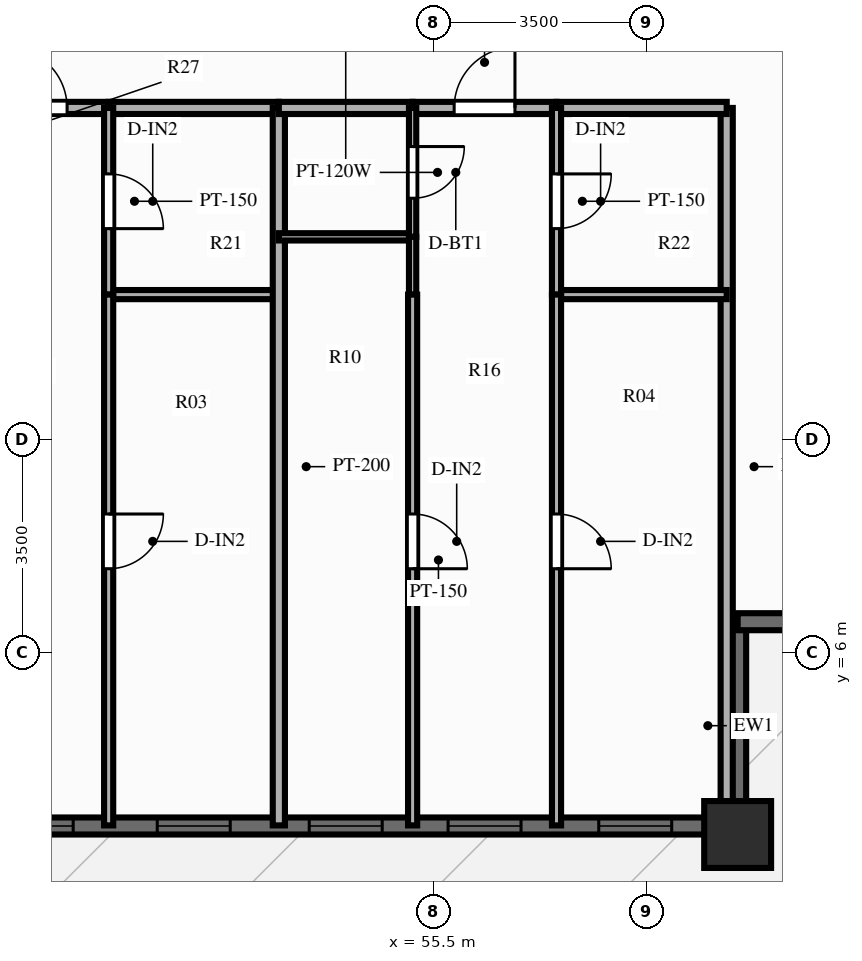
"""IFC4 building model, lengths in metres.
Left out: names, types, materials, properties, quantities, classifications, styles, units other than length and angle.
Written with IfcOpenShell. Run it as: python <this file> out.ifc"""

import sys

from ifc_helpers import new_model, si_unit, direction, frame, frame_2d, origin, origin_2d, place, context, subcontext, project, spatial, rectangle, extrude, source, transform, mapped, element, fill, save


model = new_model("IFC4")
c1 = context("Model", 3, precision=1e-05, world=origin(), true_north=direction((0.0, 1.0)))
c2 = subcontext(c1, "Body", "Model", "MODEL_VIEW")
j1 = project(units=[si_unit("LENGTHUNIT", "METRE"), si_unit("PLANEANGLEUNIT", "RADIAN")], contexts=[c1])
p1 = place(None, origin())
s1 = spatial("IfcSite", under=j1, at=p1, CompositionType="ELEMENT")
p2 = place(p1, origin())
s2 = spatial("IfcBuilding", under=s1, at=p2, CompositionType="ELEMENT")
p3 = place(p2, frame((0.0, 0.0, 19.4)))
s3 = spatial("IfcBuildingStorey", under=s2, at=p3, CompositionType="ELEMENT", Elevation=19.4)
m1 = source(origin(), c2, "Body", "SweptSolid", [
    extrude(rectangle(XDim=1.1, YDim=1.1, at=origin_2d()), origin(), (0.0, 0.0, 1.0), 3.0),
])
p4 = place(p3, frame((60.5, 3.0, 0.0), z_axis=(0.0, 0.0, 1.0), x_axis=(1.0, 0.0, 0.0)))
e1 = element("IfcColumn", 1, at=p4, inside=s3, PredefinedType="COLUMN", context=c2, shape_type="MappedRepresentation", body=[
    mapped(m1, transform((0.0, 0.0, 0.0), scale=1.0)),
])
p5 = place(p3, frame((15.5, 3.14, 0.0), z_axis=(0.0, 0.0, 1.0), x_axis=(1.0, 0.0, 0.0)))
e2 = element("IfcWall", 2, at=p5, inside=s3, PredefinedType="SOLIDWALL", context=c2, shape_type="SweptSolid", body=[
    extrude(rectangle(XDim=45.0, YDim=0.28, at=frame_2d((22.5, 0.0))), origin(), (0.0, 0.0, 1.0), 2.28),
])
p6 = place(p5, frame((0.785, 0.0, 0.25)))
e3 = element("IfcOpeningElement", 3, at=p6, cuts=e2, PredefinedType="OPENING", context=c2, shape_type="SweptSolid", body=[
    extrude(rectangle(XDim=1.2, YDim=1.5, at=frame_2d((0.6, 0.75))), frame((0.0, 0.152, 0.0), z_axis=(0.0, -1.0, 0.0), x_axis=(1.0, 0.0, 0.0)), (0.0, 0.0, 1.0), 0.304),
])
p7 = place(p5, frame((3.033, 0.0, 0.25)))
e4 = element("IfcOpeningElement", 4, at=p7, cuts=e2, PredefinedType="OPENING", context=c2, shape_type="SweptSolid", body=[
    extrude(rectangle(XDim=1.2, YDim=1.5, at=frame_2d((0.6, 0.75))), frame((0.0, 0.152, 0.0), z_axis=(0.0, -1.0, 0.0), x_axis=(1.0, 0.0, 0.0)), (0.0, 0.0, 1.0), 0.304),
])
p8 = place(p5, frame((5.727, 0.0, 0.25)))
e5 = element("IfcOpeningElement", 5, at=p8, cuts=e2, PredefinedType="OPENING", context=c2, shape_type="SweptSolid", body=[
    extrude(rectangle(XDim=1.2, YDim=1.5, at=frame_2d((0.6, 0.75))), frame((0.0, 0.152, 0.0), z_axis=(0.0, -1.0, 0.0), x_axis=(1.0, 0.0, 0.0)), (0.0, 0.0, 1.0), 0.304),
])
p9 = place(p5, frame((8.269, 0.0, 0.25)))
e6 = element("IfcOpeningElement", 6, at=p9, cuts=e2, PredefinedType="OPENING", context=c2, shape_type="SweptSolid", body=[
    extrude(rectangle(XDim=1.2, YDim=1.5, at=frame_2d((0.6, 0.75))), frame((0.0, 0.152, 0.0), z_axis=(0.0, -1.0, 0.0), x_axis=(1.0, 0.0, 0.0)), (0.0, 0.0, 1.0), 0.304),
])
p10 = place(p5, frame((10.621, 0.0, 0.25)))
e7 = element("IfcOpeningElement", 7, at=p10, cuts=e2, PredefinedType="OPENING", context=c2, shape_type="SweptSolid", body=[
    extrude(rectangle(XDim=1.2, YDim=1.5, at=frame_2d((0.6, 0.75))), frame((0.0, 0.152, 0.0), z_axis=(0.0, -1.0, 0.0), x_axis=(1.0, 0.0, 0.0)), (0.0, 0.0, 1.0), 0.304),
])
p11 = place(p5, frame((13.316, 0.0, 0.25)))
e8 = element("IfcOpeningElement", 8, at=p11, cuts=e2, PredefinedType="OPENING", context=c2, shape_type="SweptSolid", body=[
    extrude(rectangle(XDim=1.2, YDim=1.5, at=frame_2d((0.6, 0.75))), frame((0.0, 0.152, 0.0), z_axis=(0.0, -1.0, 0.0), x_axis=(1.0, 0.0, 0.0)), (0.0, 0.0, 1.0), 0.304),
])
p12 = place(p5, frame((16.624, 0.0, 0.25)))
e9 = element("IfcOpeningElement", 9, at=p12, cuts=e2, PredefinedType="OPENING", context=c2, shape_type="SweptSolid", body=[
    extrude(rectangle(XDim=0.7, YDim=1.5, at=frame_2d((0.35, 0.75))), frame((0.0, 0.152, 0.0), z_axis=(0.0, -1.0, 0.0), x_axis=(1.0, 0.0, 0.0)), (0.0, 0.0, 1.0), 0.304),
])
p13 = place(p5, frame((18.141, 0.0, 0.25)))
e10 = element("IfcOpeningElement", 10, at=p13, cuts=e2, PredefinedType="OPENING", context=c2, shape_type="SweptSolid", body=[
    extrude(rectangle(XDim=1.2, YDim=1.5, at=frame_2d((0.6, 0.75))), frame((0.0, 0.152, 0.0), z_axis=(0.0, -1.0, 0.0), x_axis=(1.0, 0.0, 0.0)), (0.0, 0.0, 1.0), 0.304),
])
p14 = place(p5, frame((21.874, 0.0, 0.0), z_axis=(0.0, 0.0, 1.0), x_axis=(-1.0, 0.0, 0.0)))
e11 = element("IfcOpeningElement", 11, at=p14, cuts=e2, PredefinedType="OPENING", context=c2, shape_type="SweptSolid", body=[
    extrude(rectangle(XDim=1.1, YDim=2.15, at=frame_2d((0.55, 1.075))), frame((0.0, 0.152, 0.0), z_axis=(0.0, -1.0, 0.0), x_axis=(1.0, 0.0, 0.0)), (0.0, 0.0, 1.0), 0.304),
])
p15 = place(p5, frame((23.223, 0.0, 0.25)))
e12 = element("IfcOpeningElement", 12, at=p15, cuts=e2, PredefinedType="OPENING", context=c2, shape_type="SweptSolid", body=[
    extrude(rectangle(XDim=1.2, YDim=1.5, at=frame_2d((0.6, 0.75))), frame((0.0, 0.152, 0.0), z_axis=(0.0, -1.0, 0.0), x_axis=(1.0, 0.0, 0.0)), (0.0, 0.0, 1.0), 0.304),
])
p16 = place(p5, frame((25.507, 0.0, 0.25)))
e13 = element("IfcOpeningElement", 13, at=p16, cuts=e2, PredefinedType="OPENING", context=c2, shape_type="SweptSolid", body=[
    extrude(rectangle(XDim=1.2, YDim=1.5, at=frame_2d((0.6, 0.75))), frame((0.0, 0.152, 0.0), z_axis=(0.0, -1.0, 0.0), x_axis=(1.0, 0.0, 0.0)), (0.0, 0.0, 1.0), 0.304),
])
p17 = place(p5, frame((27.6, 0.0, 0.25)))
e14 = element("IfcOpeningElement", 14, at=p17, cuts=e2, PredefinedType="OPENING", context=c2, shape_type="SweptSolid", body=[
    extrude(rectangle(XDim=0.7, YDim=1.5, at=frame_2d((0.35, 0.75))), frame((0.0, 0.152, 0.0), z_axis=(0.0, -1.0, 0.0), x_axis=(1.0, 0.0, 0.0)), (0.0, 0.0, 1.0), 0.304),
])
p18 = place(p5, frame((30.589, 0.0, 0.25)))
e15 = element("IfcOpeningElement", 15, at=p18, cuts=e2, PredefinedType="OPENING", context=c2, shape_type="SweptSolid", body=[
    extrude(rectangle(XDim=1.2, YDim=1.5, at=frame_2d((0.6, 0.75))), frame((0.0, 0.152, 0.0), z_axis=(0.0, -1.0, 0.0), x_axis=(1.0, 0.0, 0.0)), (0.0, 0.0, 1.0), 0.304),
])
p19 = place(p5, frame((32.872, 0.0, 0.25)))
e16 = element("IfcOpeningElement", 16, at=p19, cuts=e2, PredefinedType="OPENING", context=c2, shape_type="SweptSolid", body=[
    extrude(rectangle(XDim=1.2, YDim=1.5, at=frame_2d((0.6, 0.75))), frame((0.0, 0.152, 0.0), z_axis=(0.0, -1.0, 0.0), x_axis=(1.0, 0.0, 0.0)), (0.0, 0.0, 1.0), 0.304),
])
p20 = place(p5, frame((35.455, 0.0, 0.25)))
e17 = element("IfcOpeningElement", 17, at=p20, cuts=e2, PredefinedType="OPENING", context=c2, shape_type="SweptSolid", body=[
    extrude(rectangle(XDim=1.2, YDim=1.5, at=frame_2d((0.6, 0.75))), frame((0.0, 0.152, 0.0), z_axis=(0.0, -1.0, 0.0), x_axis=(1.0, 0.0, 0.0)), (0.0, 0.0, 1.0), 0.304),
])
p21 = place(p5, frame((37.954, 0.0, 0.25)))
e18 = element("IfcOpeningElement", 18, at=p21, cuts=e2, PredefinedType="OPENING", context=c2, shape_type="SweptSolid", body=[
    extrude(rectangle(XDim=1.2, YDim=1.5, at=frame_2d((0.6, 0.75))), frame((0.0, 0.152, 0.0), z_axis=(0.0, -1.0, 0.0), x_axis=(1.0, 0.0, 0.0)), (0.0, 0.0, 1.0), 0.304),
])
p22 = place(p5, frame((40.238, 0.0, 0.25)))
e19 = element("IfcOpeningElement", 19, at=p22, cuts=e2, PredefinedType="OPENING", context=c2, shape_type="SweptSolid", body=[
    extrude(rectangle(XDim=1.2, YDim=1.5, at=frame_2d((0.6, 0.75))), frame((0.0, 0.152, 0.0), z_axis=(0.0, -1.0, 0.0), x_axis=(1.0, 0.0, 0.0)), (0.0, 0.0, 1.0), 0.304),
])
p23 = place(p5, frame((42.716, 0.0, 0.25)))
e20 = element("IfcOpeningElement", 20, at=p23, cuts=e2, PredefinedType="OPENING", context=c2, shape_type="SweptSolid", body=[
    extrude(rectangle(XDim=1.2, YDim=1.5, at=frame_2d((0.6, 0.75))), frame((0.0, 0.152, 0.0), z_axis=(0.0, -1.0, 0.0), x_axis=(1.0, 0.0, 0.0)), (0.0, 0.0, 1.0), 0.304),
])
for number, where, z_axis, x_axis in (
    (21, (60.5, 3.08, 0.0), (0.0, 0.0, 1.0), (0.0, 1.0, 0.0)),
    (22, (60.5, 6.5, 0.0), (0.0, 0.0, 1.0), (1.0, 0.0, 0.0)),
):
    element("IfcWall", number, at=place(p3, frame(where, z_axis=z_axis, x_axis=x_axis)), inside=s3, PredefinedType="SOLIDWALL", context=c2, shape_type="SweptSolid", body=[
        extrude(rectangle(XDim=3.42, YDim=0.28, at=frame_2d((1.71, 0.0))), origin(), (0.0, 0.0, 1.0), 2.28),
    ])
p24 = place(p3, frame((60.32, 14.95, 0.0), z_axis=(0.0, 0.0, 1.0), x_axis=(0.0, -1.0, 0.0)))
e23 = element("IfcWall", 23, at=p24, inside=s3, PredefinedType="PARTITIONING", context=c2, shape_type="SweptSolid", body=[
    extrude(rectangle(XDim=11.8, YDim=0.2, at=frame_2d((5.9, 0.0))), origin(), (0.0, 0.0, 1.0), 2.79),
])
p25 = place(p3, frame((47.789, 14.95, 0.0), z_axis=(0.0, 0.0, 1.0), x_axis=(1.0, 0.0, 0.0)))
e24 = element("IfcWall", 24, at=p25, inside=s3, PredefinedType="PARTITIONING", context=c2, shape_type="SweptSolid", body=[
    extrude(rectangle(XDim=2.367, YDim=0.2, at=frame_2d((1.183, 0.0))), origin(), (0.0, 0.0, 1.0), 2.79),
])
p26 = place(p25, frame((0.683, 0.0, 0.0)))
e25 = element("IfcOpeningElement", 25, at=p26, cuts=e24, PredefinedType="OPENING", context=c2, shape_type="SweptSolid", body=[
    extrude(rectangle(XDim=1.0, YDim=2.15, at=frame_2d((0.5, 1.075))), frame((0.0, 0.112, 0.0), z_axis=(0.0, -1.0, 0.0), x_axis=(1.0, 0.0, 0.0)), (0.0, 0.0, 1.0), 0.224),
])
p27 = place(p3, frame((50.156, 14.95, 0.0), z_axis=(0.0, 0.0, 1.0), x_axis=(1.0, 0.0, 0.0)))
e26 = element("IfcWall", 26, at=p27, inside=s3, PredefinedType="PARTITIONING", context=c2, shape_type="SweptSolid", body=[
    extrude(rectangle(XDim=2.799, YDim=0.2, at=frame_2d((1.399, 0.0))), origin(), (0.0, 0.0, 1.0), 2.79),
])
p28 = place(p3, frame((50.156, 11.88, 0.0), z_axis=(0.0, 0.0, 1.0), x_axis=(1.0, 0.0, 0.0)))
e27 = element("IfcWall", 27, at=p28, inside=s3, PredefinedType="PARTITIONING", context=c2, shape_type="SweptSolid", body=[
    extrude(rectangle(XDim=2.799, YDim=0.15, at=frame_2d((1.399, 0.0))), origin(), (0.0, 0.0, 1.0), 2.79),
])
p29 = place(p3, frame((50.156, 14.95, 0.0), z_axis=(0.0, 0.0, 1.0), x_axis=(0.0, -1.0, 0.0)))
e28 = element("IfcWall", 28, at=p29, inside=s3, PredefinedType="PARTITIONING", context=c2, shape_type="SweptSolid", body=[
    extrude(rectangle(XDim=3.07, YDim=0.15, at=frame_2d((1.535, 0.0))), origin(), (0.0, 0.0, 1.0), 2.79),
])
p30 = place(p29, frame((1.085, 0.0, 0.0)))
e29 = element("IfcOpeningElement", 29, at=p30, cuts=e28, PredefinedType="OPENING", context=c2, shape_type="SweptSolid", body=[
    extrude(rectangle(XDim=0.9, YDim=2.1, at=frame_2d((0.45, 1.05))), frame((0.0, 0.087, 0.0), z_axis=(0.0, -1.0, 0.0), x_axis=(1.0, 0.0, 0.0)), (0.0, 0.0, 1.0), 0.174),
])
p31 = place(p3, frame((50.156, 11.88, 0.0), z_axis=(0.0, 0.0, 1.0), x_axis=(0.0, -1.0, 0.0)))
e30 = element("IfcWall", 30, at=p31, inside=s3, PredefinedType="PARTITIONING", context=c2, shape_type="SweptSolid", body=[
    extrude(rectangle(XDim=8.73, YDim=0.15, at=frame_2d((4.365, 0.0))), origin(), (0.0, 0.0, 1.0), 2.79),
])
p32 = place(p31, frame((3.609, 0.0, 0.0)))
e31 = element("IfcOpeningElement", 31, at=p32, cuts=e30, PredefinedType="OPENING", context=c2, shape_type="SweptSolid", body=[
    extrude(rectangle(XDim=0.9, YDim=2.1, at=frame_2d((0.45, 1.05))), frame((0.0, 0.087, 0.0), z_axis=(0.0, -1.0, 0.0), x_axis=(1.0, 0.0, 0.0)), (0.0, 0.0, 1.0), 0.174),
])
p33 = place(p3, frame((52.954, 14.95, 0.0), z_axis=(0.0, 0.0, 1.0), x_axis=(0.0, -1.0, 0.0)))
e32 = element("IfcWall", 32, at=p33, inside=s3, PredefinedType="PARTITIONING", context=c2, shape_type="SweptSolid", body=[
    extrude(rectangle(XDim=11.8, YDim=0.2, at=frame_2d((5.9, 0.0))), origin(), (0.0, 0.0, 1.0), 2.79),
])
p34 = place(p3, frame((52.954, 14.95, 0.0), z_axis=(0.0, 0.0, 1.0), x_axis=(1.0, 0.0, 0.0)))
e33 = element("IfcWall", 33, at=p34, inside=s3, PredefinedType="PARTITIONING", context=c2, shape_type="SweptSolid", body=[
    extrude(rectangle(XDim=2.2, YDim=0.2, at=frame_2d((1.1, 0.0))), origin(), (0.0, 0.0, 1.0), 2.79),
])
p35 = place(p3, frame((55.154, 14.95, 0.0), z_axis=(0.0, 0.0, 1.0), x_axis=(1.0, 0.0, 0.0)))
e34 = element("IfcWall", 34, at=p35, inside=s3, PredefinedType="PARTITIONING", context=c2, shape_type="SweptSolid", body=[
    extrude(rectangle(XDim=2.367, YDim=0.2, at=frame_2d((1.183, 0.0))), origin(), (0.0, 0.0, 1.0), 2.79),
])
p36 = place(p35, frame((0.683, 0.0, 0.0)))
e35 = element("IfcOpeningElement", 35, at=p36, cuts=e34, PredefinedType="OPENING", context=c2, shape_type="SweptSolid", body=[
    extrude(rectangle(XDim=1.0, YDim=2.15, at=frame_2d((0.5, 1.075))), frame((0.0, 0.112, 0.0), z_axis=(0.0, -1.0, 0.0), x_axis=(1.0, 0.0, 0.0)), (0.0, 0.0, 1.0), 0.224),
])
p37 = place(p3, frame((57.521, 14.95, 0.0), z_axis=(0.0, 0.0, 1.0), x_axis=(1.0, 0.0, 0.0)))
e36 = element("IfcWall", 36, at=p37, inside=s3, PredefinedType="PARTITIONING", context=c2, shape_type="SweptSolid", body=[
    extrude(rectangle(XDim=2.799, YDim=0.2, at=frame_2d((1.399, 0.0))), origin(), (0.0, 0.0, 1.0), 2.79),
])
p38 = place(p3, frame((52.954, 12.83, 0.0), z_axis=(0.0, 0.0, 1.0), x_axis=(1.0, 0.0, 0.0)))
e37 = element("IfcWall", 37, at=p38, inside=s3, PredefinedType="PARTITIONING", context=c2, shape_type="SweptSolid", body=[
    extrude(rectangle(XDim=2.2, YDim=0.12, at=frame_2d((1.1, 0.0))), origin(), (0.0, 0.0, 1.0), 2.79),
])
p39 = place(p3, frame((57.521, 11.88, 0.0), z_axis=(0.0, 0.0, 1.0), x_axis=(1.0, 0.0, 0.0)))
e38 = element("IfcWall", 38, at=p39, inside=s3, PredefinedType="PARTITIONING", context=c2, shape_type="SweptSolid", body=[
    extrude(rectangle(XDim=2.799, YDim=0.15, at=frame_2d((1.399, 0.0))), origin(), (0.0, 0.0, 1.0), 2.79),
])
p40 = place(p3, frame((55.154, 14.95, 0.0), z_axis=(0.0, 0.0, 1.0), x_axis=(0.0, -1.0, 0.0)))
e39 = element("IfcWall", 39, at=p40, inside=s3, PredefinedType="PARTITIONING", context=c2, shape_type="SweptSolid", body=[
    extrude(rectangle(XDim=2.12, YDim=0.12, at=frame_2d((1.06, 0.0))), origin(), (0.0, 0.0, 1.0), 2.79),
])
p41 = place(p40, frame((0.635, 0.0, 0.0)))
e40 = element("IfcOpeningElement", 40, at=p41, cuts=e39, PredefinedType="OPENING", context=c2, shape_type="SweptSolid", body=[
    extrude(rectangle(XDim=0.85, YDim=2.05, at=frame_2d((0.425, 1.025))), frame((0.0, 0.072, 0.0), z_axis=(0.0, -1.0, 0.0), x_axis=(1.0, 0.0, 0.0)), (0.0, 0.0, 1.0), 0.144),
])
p42 = place(p3, frame((55.154, 12.83, 0.0), z_axis=(0.0, 0.0, 1.0), x_axis=(0.0, -1.0, 0.0)))
e41 = element("IfcWall", 41, at=p42, inside=s3, PredefinedType="PARTITIONING", context=c2, shape_type="SweptSolid", body=[
    extrude(rectangle(XDim=0.95, YDim=0.12, at=frame_2d((0.475, 0.0))), origin(), (0.0, 0.0, 1.0), 2.79),
])
p43 = place(p3, frame((55.154, 11.88, 0.0), z_axis=(0.0, 0.0, 1.0), x_axis=(0.0, -1.0, 0.0)))
e42 = element("IfcWall", 42, at=p43, inside=s3, PredefinedType="PARTITIONING", context=c2, shape_type="SweptSolid", body=[
    extrude(rectangle(XDim=8.73, YDim=0.15, at=frame_2d((4.365, 0.0))), origin(), (0.0, 0.0, 1.0), 2.79),
])
p44 = place(p43, frame((3.609, 0.0, 0.0)))
e43 = element("IfcOpeningElement", 43, at=p44, cuts=e42, PredefinedType="OPENING", context=c2, shape_type="SweptSolid", body=[
    extrude(rectangle(XDim=0.9, YDim=2.1, at=frame_2d((0.45, 1.05))), frame((0.0, 0.087, 0.0), z_axis=(0.0, -1.0, 0.0), x_axis=(1.0, 0.0, 0.0)), (0.0, 0.0, 1.0), 0.174),
])
p45 = place(p3, frame((57.521, 14.95, 0.0), z_axis=(0.0, 0.0, 1.0), x_axis=(0.0, -1.0, 0.0)))
e44 = element("IfcWall", 44, at=p45, inside=s3, PredefinedType="PARTITIONING", context=c2, shape_type="SweptSolid", body=[
    extrude(rectangle(XDim=3.07, YDim=0.15, at=frame_2d((1.535, 0.0))), origin(), (0.0, 0.0, 1.0), 2.79),
])
p46 = place(p45, frame((1.085, 0.0, 0.0)))
e45 = element("IfcOpeningElement", 45, at=p46, cuts=e44, PredefinedType="OPENING", context=c2, shape_type="SweptSolid", body=[
    extrude(rectangle(XDim=0.9, YDim=2.1, at=frame_2d((0.45, 1.05))), frame((0.0, 0.087, 0.0), z_axis=(0.0, -1.0, 0.0), x_axis=(1.0, 0.0, 0.0)), (0.0, 0.0, 1.0), 0.174),
])
p47 = place(p3, frame((57.521, 11.88, 0.0), z_axis=(0.0, 0.0, 1.0), x_axis=(0.0, -1.0, 0.0)))
e46 = element("IfcWall", 46, at=p47, inside=s3, PredefinedType="PARTITIONING", context=c2, shape_type="SweptSolid", body=[
    extrude(rectangle(XDim=8.73, YDim=0.15, at=frame_2d((4.365, 0.0))), origin(), (0.0, 0.0, 1.0), 2.79),
])
p48 = place(p47, frame((3.609, 0.0, 0.0)))
e47 = element("IfcOpeningElement", 47, at=p48, cuts=e46, PredefinedType="OPENING", context=c2, shape_type="SweptSolid", body=[
    extrude(rectangle(XDim=0.9, YDim=2.1, at=frame_2d((0.45, 1.05))), frame((0.0, 0.087, 0.0), z_axis=(0.0, -1.0, 0.0), x_axis=(1.0, 0.0, 0.0)), (0.0, 0.0, 1.0), 0.174),
])
m2 = source(origin(), c2, "Body", "SweptSolid", [
    extrude(rectangle(XDim=1.2, YDim=1.5, at=frame_2d((0.6, 0.75))), frame((0.0, 0.03, 0.0), z_axis=(0.0, -1.0, 0.0), x_axis=(1.0, 0.0, 0.0)), (0.0, 0.0, 1.0), 0.06),
])
p49 = place(p19, origin())
e48 = element("IfcWindow", 48, at=p49, inside=s3, PartitioningType="SINGLE_PANEL", PredefinedType="WINDOW", context=c2, shape_type="MappedRepresentation", body=[
    mapped(m2, transform((0.0, 0.0, 0.0), scale=1.0)),
])
fill(e16, e48)
p50 = place(p20, origin())
e49 = element("IfcWindow", 49, at=p50, inside=s3, PartitioningType="SINGLE_PANEL", PredefinedType="WINDOW", context=c2, shape_type="MappedRepresentation", body=[
    mapped(m2, transform((0.0, 0.0, 0.0), scale=1.0)),
])
fill(e17, e49)
p51 = place(p21, origin())
e50 = element("IfcWindow", 50, at=p51, inside=s3, PartitioningType="SINGLE_PANEL", PredefinedType="WINDOW", context=c2, shape_type="MappedRepresentation", body=[
    mapped(m2, transform((0.0, 0.0, 0.0), scale=1.0)),
])
fill(e18, e50)
p52 = place(p22, origin())
e51 = element("IfcWindow", 51, at=p52, inside=s3, PartitioningType="SINGLE_PANEL", PredefinedType="WINDOW", context=c2, shape_type="MappedRepresentation", body=[
    mapped(m2, transform((0.0, 0.0, 0.0), scale=1.0)),
])
fill(e19, e51)
p53 = place(p23, origin())
e52 = element("IfcWindow", 52, at=p53, inside=s3, PartitioningType="SINGLE_PANEL", PredefinedType="WINDOW", context=c2, shape_type="MappedRepresentation", body=[
    mapped(m2, transform((0.0, 0.0, 0.0), scale=1.0)),
])
fill(e20, e52)
m3 = source(origin(), c2, "Body", "SweptSolid", [
    extrude(rectangle(XDim=1.0, YDim=2.15, at=frame_2d((0.5, 1.075))), frame((0.0, 0.025, 0.0), z_axis=(0.0, -1.0, 0.0), x_axis=(1.0, 0.0, 0.0)), (0.0, 0.0, 1.0), 0.05),
])
p54 = place(p26, origin())
e53 = element("IfcDoor", 53, at=p54, inside=s3, OperationType="SINGLE_SWING_LEFT", PredefinedType="DOOR", context=c2, shape_type="MappedRepresentation", body=[
    mapped(m3, transform((0.0, 0.0, 0.0), scale=1.0)),
])
fill(e25, e53)
m4 = source(origin(), c2, "Body", "SweptSolid", [
    extrude(rectangle(XDim=0.9, YDim=2.1, at=frame_2d((0.45, 1.05))), frame((0.0, 0.025, 0.0), z_axis=(0.0, -1.0, 0.0), x_axis=(1.0, 0.0, 0.0)), (0.0, 0.0, 1.0), 0.05),
])
p55 = place(p30, origin())
e54 = element("IfcDoor", 54, at=p55, inside=s3, OperationType="SINGLE_SWING_RIGHT", PredefinedType="DOOR", context=c2, shape_type="MappedRepresentation", body=[
    mapped(m4, transform((0.0, 0.0, 0.0), scale=1.0)),
])
fill(e29, e54)
p56 = place(p32, origin())
e55 = element("IfcDoor", 55, at=p56, inside=s3, OperationType="SINGLE_SWING_LEFT", PredefinedType="DOOR", context=c2, shape_type="MappedRepresentation", body=[
    mapped(m4, transform((0.0, 0.0, 0.0), scale=1.0)),
])
fill(e31, e55)
p57 = place(p36, origin())
e56 = element("IfcDoor", 56, at=p57, inside=s3, OperationType="SINGLE_SWING_RIGHT", PredefinedType="DOOR", context=c2, shape_type="MappedRepresentation", body=[
    mapped(m3, transform((0.0, 0.0, 0.0), scale=1.0)),
])
fill(e35, e56)
m5 = source(origin(), c2, "Body", "SweptSolid", [
    extrude(rectangle(XDim=0.85, YDim=2.05, at=frame_2d((0.425, 1.025))), frame((0.0, 0.025, 0.0), z_axis=(0.0, -1.0, 0.0), x_axis=(1.0, 0.0, 0.0)), (0.0, 0.0, 1.0), 0.05),
])
p58 = place(p41, origin())
e57 = element("IfcDoor", 57, at=p58, inside=s3, OperationType="SINGLE_SWING_LEFT", PredefinedType="DOOR", context=c2, shape_type="MappedRepresentation", body=[
    mapped(m5, transform((0.0, 0.0, 0.0), scale=1.0)),
])
fill(e40, e57)
p59 = place(p44, origin())
e58 = element("IfcDoor", 58, at=p59, inside=s3, OperationType="SINGLE_SWING_RIGHT", PredefinedType="DOOR", context=c2, shape_type="MappedRepresentation", body=[
    mapped(m4, transform((0.0, 0.0, 0.0), scale=1.0)),
])
fill(e43, e58)
p60 = place(p46, origin())
e59 = element("IfcDoor", 59, at=p60, inside=s3, OperationType="SINGLE_SWING_LEFT", PredefinedType="DOOR", context=c2, shape_type="MappedRepresentation", body=[
    mapped(m4, transform((0.0, 0.0, 0.0), scale=1.0)),
])
fill(e45, e59)
p61 = place(p48, origin())
e60 = element("IfcDoor", 60, at=p61, inside=s3, OperationType="SINGLE_SWING_RIGHT", PredefinedType="DOOR", context=c2, shape_type="MappedRepresentation", body=[
    mapped(m4, transform((0.0, 0.0, 0.0), scale=1.0)),
])
fill(e47, e60)
save(model, sys.argv[1])
